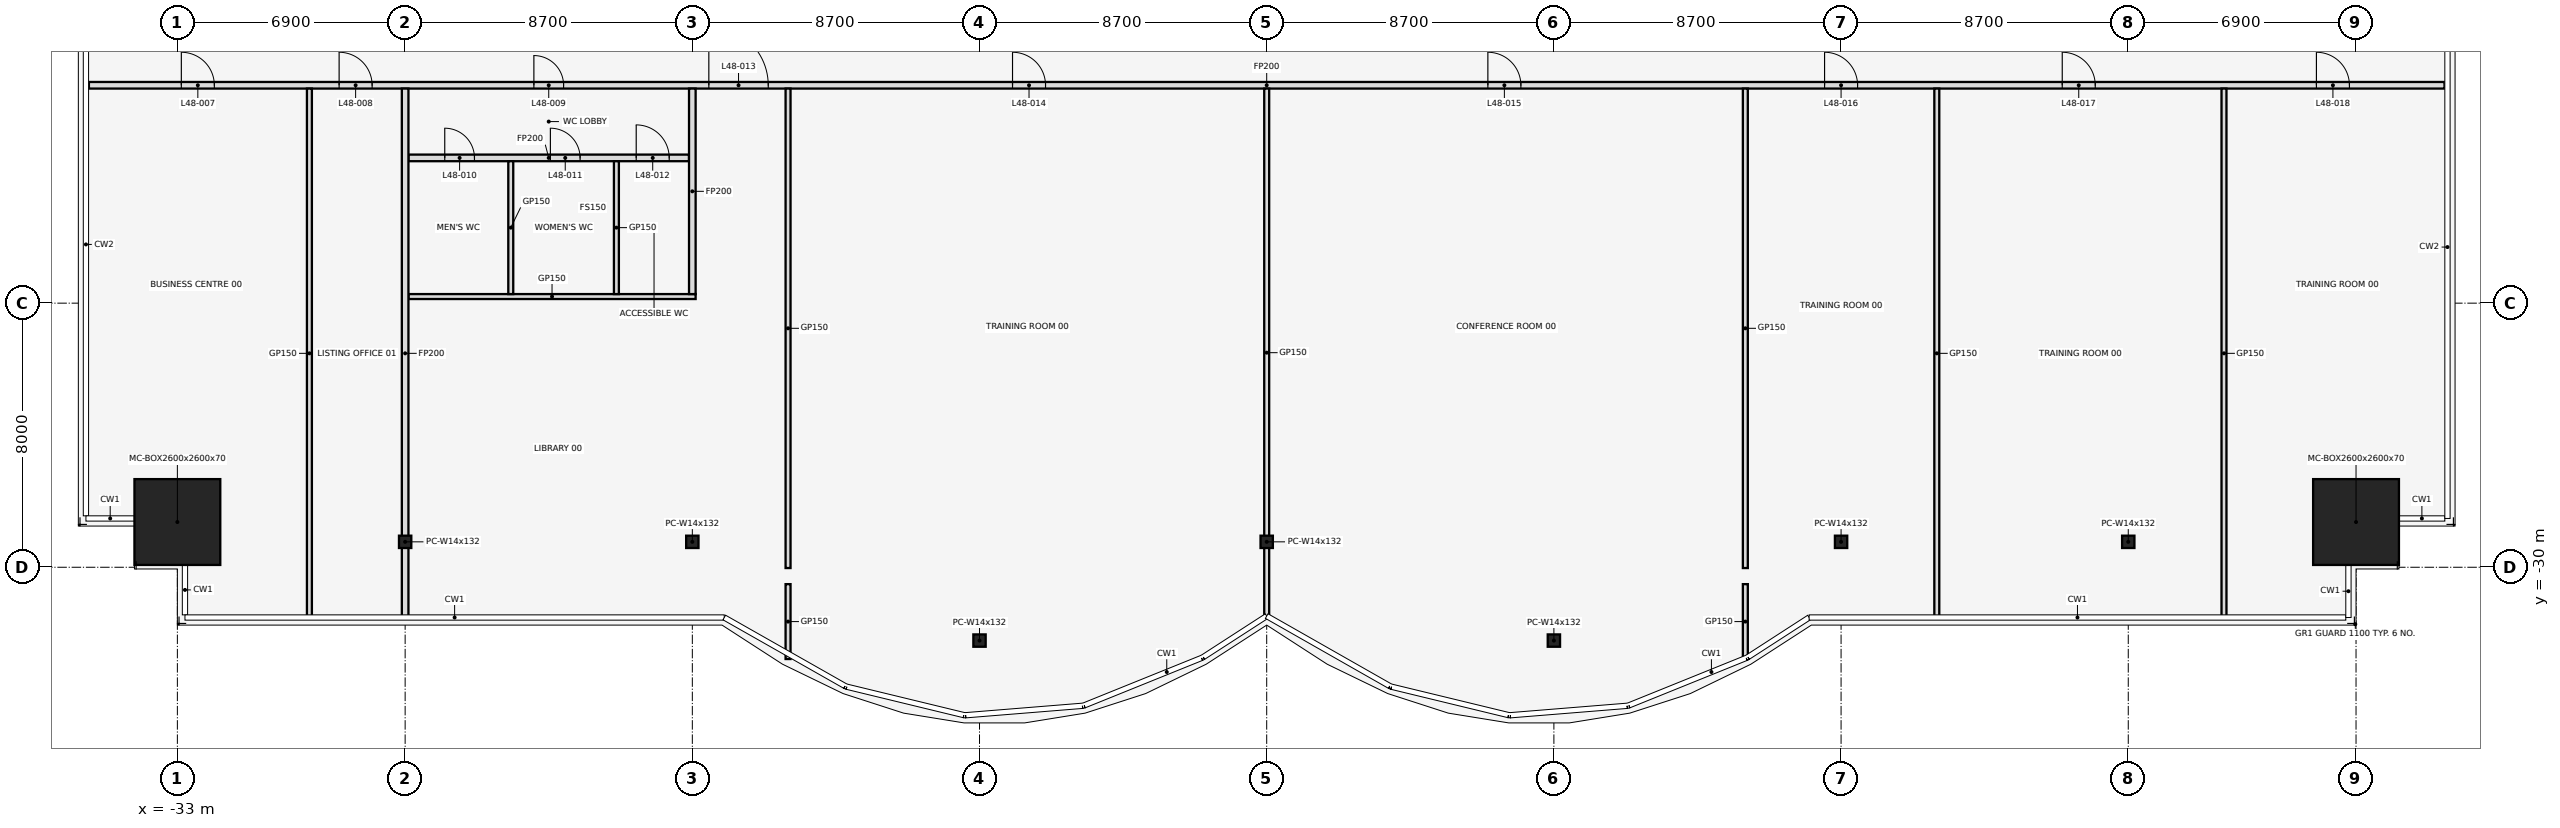
"""IFC4 building model, lengths in metres.
Left out: names, types, materials, properties, quantities, classifications, styles, units other than length and angle.
Written with IfcOpenShell. Run it as: python <this file> out.ifc"""

import sys

from ifc_helpers import new_model, si_unit, direction, frame, frame_2d, origin, origin_2d, place, context, subcontext, project, spatial, rectangle, hollow_rectangle, i_section, extrude, element, fill, save


model = new_model("IFC4")
c1 = context("Model", 3, precision=1e-05, world=origin(), true_north=direction((0.0, 1.0)))
c2 = subcontext(c1, "Body", "Model", "MODEL_VIEW")
j1 = project(units=[si_unit("LENGTHUNIT", "METRE"), si_unit("PLANEANGLEUNIT", "RADIAN")], contexts=[c1])
p1 = place(None, origin())
s1 = spatial("IfcSite", under=j1, at=p1, CompositionType="ELEMENT")
p2 = place(p1, origin())
s2 = spatial("IfcBuilding", under=s1, at=p2, CompositionType="ELEMENT")
p3 = place(p2, frame((0.0, 0.0, 215.5)))
s3 = spatial("IfcBuildingStorey", under=s2, at=p3, CompositionType="ELEMENT", Elevation=215.5)
p4 = place(p3, frame((-33.0, -28.63, 0.0), z_axis=(0.0, 0.0, 1.0), x_axis=(1.0, 0.0, 0.0)))
e1 = element("IfcColumn", 1, at=p4, inside=s3, PredefinedType="COLUMN", context=c2, shape_type="SweptSolid", body=[
    extrude(hollow_rectangle(XDim=2.6, YDim=2.6, WallThickness=0.07, at=origin_2d()), origin(), (0.0, 0.0, 1.0), 4.1),
])
for number, where, z_axis, x_axis in (
    (2, (-26.1, -29.23, 0.0), (0.0, 0.0, 1.0), (1.0, 0.0, 0.0)),
    (3, (-17.4, -29.23, 0.0), (0.0, 0.0, 1.0), (1.0, 0.0, 0.0)),
    (4, (-8.7, -32.221, 0.0), (0.0, 0.0, 1.0), (1.0, 0.0, 0.0)),
    (5, (0.0, -29.23, 0.0), (0.0, 0.0, 1.0), (1.0, 0.0, 0.0)),
    (6, (8.7, -32.221, 0.0), (0.0, 0.0, 1.0), (1.0, 0.0, 0.0)),
    (7, (17.4, -29.23, 0.0), (0.0, 0.0, 1.0), (1.0, 0.0, 0.0)),
    (8, (26.1, -29.23, 0.0), (0.0, 0.0, 1.0), (1.0, 0.0, 0.0)),
):
    element("IfcColumn", number, at=place(p3, frame(where, z_axis=z_axis, x_axis=x_axis)), inside=s3, PredefinedType="COLUMN", context=c2, shape_type="SweptSolid", body=[
        extrude(i_section(OverallWidth=0.373, OverallDepth=0.373, WebThickness=0.016, FlangeThickness=0.026, at=origin_2d()), origin(), (0.0, 0.0, 1.0), 4.1),
    ])
p5 = place(p3, frame((33.0, -28.63, 0.0), z_axis=(0.0, 0.0, 1.0), x_axis=(1.0, 0.0, 0.0)))
e9 = element("IfcColumn", 9, at=p5, inside=s3, PredefinedType="COLUMN", context=c2, shape_type="SweptSolid", body=[
    extrude(hollow_rectangle(XDim=2.6, YDim=2.6, WallThickness=0.07, at=origin_2d()), origin(), (0.0, 0.0, 1.0), 4.1),
])
p6 = place(p3, frame((-26.0, -21.8, 0.0), z_axis=(0.0, 0.0, 1.0), x_axis=(1.0, 0.0, 0.0)))
e10 = element("IfcWall", 10, at=p6, inside=s3, PredefinedType="PARTITIONING", context=c2, shape_type="SweptSolid", body=[
    extrude(rectangle(XDim=8.7, YDim=0.15, at=frame_2d((4.35, 0.0))), origin(), (0.0, 0.0, 1.0), 2.84),
])
p7 = place(p3, frame((-26.0, -17.6, 0.0), z_axis=(0.0, 0.0, 1.0), x_axis=(1.0, 0.0, 0.0)))
e11 = element("IfcWall", 11, at=p7, inside=s3, PredefinedType="PARTITIONING", context=c2, shape_type="SweptSolid", body=[
    extrude(rectangle(XDim=8.5, YDim=0.2, at=frame_2d((4.25, 0.0))), origin(), (0.0, 0.0, 1.0), 2.84),
])
p8 = place(p7, frame((1.1, 0.0, 0.0)))
e12 = element("IfcOpeningElement", 12, at=p8, cuts=e11, PredefinedType="OPENING", context=c2, shape_type="SweptSolid", body=[
    extrude(rectangle(XDim=0.9, YDim=2.1, at=frame_2d((0.45, 1.05))), frame((0.0, 0.112, 0.0), z_axis=(0.0, -1.0, 0.0), x_axis=(1.0, 0.0, 0.0)), (0.0, 0.0, 1.0), 0.224),
])
p9 = place(p7, frame((4.3, 0.0, 0.0)))
e13 = element("IfcOpeningElement", 13, at=p9, cuts=e11, PredefinedType="OPENING", context=c2, shape_type="SweptSolid", body=[
    extrude(rectangle(XDim=0.9, YDim=2.1, at=frame_2d((0.45, 1.05))), frame((0.0, 0.112, 0.0), z_axis=(0.0, -1.0, 0.0), x_axis=(1.0, 0.0, 0.0)), (0.0, 0.0, 1.0), 0.224),
])
p10 = place(p7, frame((6.9, 0.0, 0.0)))
e14 = element("IfcOpeningElement", 14, at=p10, cuts=e11, PredefinedType="OPENING", context=c2, shape_type="SweptSolid", body=[
    extrude(rectangle(XDim=1.0, YDim=2.1, at=frame_2d((0.5, 1.05))), frame((0.0, 0.112, 0.0), z_axis=(0.0, -1.0, 0.0), x_axis=(1.0, 0.0, 0.0)), (0.0, 0.0, 1.0), 0.224),
])
p11 = place(p3, frame((-35.68, -15.4, 0.0), z_axis=(0.0, 0.0, 1.0), x_axis=(1.0, 0.0, 0.0)))
e15 = element("IfcWall", 15, at=p11, inside=s3, PredefinedType="PARTITIONING", context=c2, shape_type="SweptSolid", body=[
    extrude(rectangle(XDim=71.36, YDim=0.2, at=frame_2d((35.68, 0.0))), origin(), (0.0, 0.0, 1.0), 2.84),
])
p12 = place(p11, frame((2.8, 0.0, 0.0)))
e16 = element("IfcOpeningElement", 16, at=p12, cuts=e15, PredefinedType="OPENING", context=c2, shape_type="SweptSolid", body=[
    extrude(rectangle(XDim=1.0, YDim=2.1, at=frame_2d((0.5, 1.05))), frame((0.0, 0.112, 0.0), z_axis=(0.0, -1.0, 0.0), x_axis=(1.0, 0.0, 0.0)), (0.0, 0.0, 1.0), 0.224),
])
p13 = place(p11, frame((7.58, 0.0, 0.0)))
e17 = element("IfcOpeningElement", 17, at=p13, cuts=e15, PredefinedType="OPENING", context=c2, shape_type="SweptSolid", body=[
    extrude(rectangle(XDim=1.0, YDim=2.1, at=frame_2d((0.5, 1.05))), frame((0.0, 0.112, 0.0), z_axis=(0.0, -1.0, 0.0), x_axis=(1.0, 0.0, 0.0)), (0.0, 0.0, 1.0), 0.224),
])
p14 = place(p11, frame((13.48, 0.0, 0.0)))
e18 = element("IfcOpeningElement", 18, at=p14, cuts=e15, PredefinedType="OPENING", context=c2, shape_type="SweptSolid", body=[
    extrude(rectangle(XDim=0.9, YDim=2.1, at=frame_2d((0.45, 1.05))), frame((0.0, 0.112, 0.0), z_axis=(0.0, -1.0, 0.0), x_axis=(1.0, 0.0, 0.0)), (0.0, 0.0, 1.0), 0.224),
])
p15 = place(p11, frame((18.78, 0.0, 0.0)))
e19 = element("IfcOpeningElement", 19, at=p15, cuts=e15, PredefinedType="OPENING", context=c2, shape_type="SweptSolid", body=[
    extrude(rectangle(XDim=1.8, YDim=2.1, at=frame_2d((0.9, 1.05))), frame((0.0, 0.112, 0.0), z_axis=(0.0, -1.0, 0.0), x_axis=(1.0, 0.0, 0.0)), (0.0, 0.0, 1.0), 0.224),
])
p16 = place(p11, frame((27.98, 0.0, 0.0)))
e20 = element("IfcOpeningElement", 20, at=p16, cuts=e15, PredefinedType="OPENING", context=c2, shape_type="SweptSolid", body=[
    extrude(rectangle(XDim=1.0, YDim=2.1, at=frame_2d((0.5, 1.05))), frame((0.0, 0.112, 0.0), z_axis=(0.0, -1.0, 0.0), x_axis=(1.0, 0.0, 0.0)), (0.0, 0.0, 1.0), 0.224),
])
p17 = place(p11, frame((42.38, 0.0, 0.0)))
e21 = element("IfcOpeningElement", 21, at=p17, cuts=e15, PredefinedType="OPENING", context=c2, shape_type="SweptSolid", body=[
    extrude(rectangle(XDim=1.0, YDim=2.1, at=frame_2d((0.5, 1.05))), frame((0.0, 0.112, 0.0), z_axis=(0.0, -1.0, 0.0), x_axis=(1.0, 0.0, 0.0)), (0.0, 0.0, 1.0), 0.224),
])
p18 = place(p11, frame((52.58, 0.0, 0.0)))
e22 = element("IfcOpeningElement", 22, at=p18, cuts=e15, PredefinedType="OPENING", context=c2, shape_type="SweptSolid", body=[
    extrude(rectangle(XDim=1.0, YDim=2.1, at=frame_2d((0.5, 1.05))), frame((0.0, 0.112, 0.0), z_axis=(0.0, -1.0, 0.0), x_axis=(1.0, 0.0, 0.0)), (0.0, 0.0, 1.0), 0.224),
])
p19 = place(p11, frame((59.78, 0.0, 0.0)))
e23 = element("IfcOpeningElement", 23, at=p19, cuts=e15, PredefinedType="OPENING", context=c2, shape_type="SweptSolid", body=[
    extrude(rectangle(XDim=1.0, YDim=2.1, at=frame_2d((0.5, 1.05))), frame((0.0, 0.112, 0.0), z_axis=(0.0, -1.0, 0.0), x_axis=(1.0, 0.0, 0.0)), (0.0, 0.0, 1.0), 0.224),
])
p20 = place(p11, frame((67.48, 0.0, 0.0)))
e24 = element("IfcOpeningElement", 24, at=p20, cuts=e15, PredefinedType="OPENING", context=c2, shape_type="SweptSolid", body=[
    extrude(rectangle(XDim=1.0, YDim=2.1, at=frame_2d((0.5, 1.05))), frame((0.0, 0.112, 0.0), z_axis=(0.0, -1.0, 0.0), x_axis=(1.0, 0.0, 0.0)), (0.0, 0.0, 1.0), 0.224),
])
p21 = place(p3, frame((-29.0, -31.54, 0.0), z_axis=(0.0, 0.0, 1.0), x_axis=(0.0, 1.0, 0.0)))
e25 = element("IfcWall", 25, at=p21, inside=s3, PredefinedType="PARTITIONING", context=c2, shape_type="SweptSolid", body=[
    extrude(rectangle(XDim=16.04, YDim=0.15, at=frame_2d((8.02, 0.0))), origin(), (0.0, 0.0, 1.0), 2.84),
])
p22 = place(p3, frame((-26.1, -31.54, 0.0), z_axis=(0.0, 0.0, 1.0), x_axis=(0.0, 1.0, 0.0)))
e26 = element("IfcWall", 26, at=p22, inside=s3, PredefinedType="PARTITIONING", context=c2, shape_type="SweptSolid", body=[
    extrude(rectangle(XDim=16.04, YDim=0.2, at=frame_2d((8.02, 0.0))), origin(), (0.0, 0.0, 1.0), 2.84),
])
for number, where, z_axis, x_axis in (
    (27, (-22.9, -21.725, 0.0), (0.0, 0.0, 1.0), (0.0, 1.0, 0.0)),
    (28, (-19.7, -21.725, 0.0), (0.0, 0.0, 1.0), (0.0, 1.0, 0.0)),
):
    element("IfcWall", number, at=place(p3, frame(where, z_axis=z_axis, x_axis=x_axis)), inside=s3, PredefinedType="PARTITIONING", context=c2, shape_type="SweptSolid", body=[
        extrude(rectangle(XDim=4.025, YDim=0.15, at=frame_2d((2.013, 0.0))), origin(), (0.0, 0.0, 1.0), 2.84),
    ])
p23 = place(p3, frame((-17.4, -21.725, 0.0), z_axis=(0.0, 0.0, 1.0), x_axis=(0.0, 1.0, 0.0)))
e29 = element("IfcWall", 29, at=p23, inside=s3, PredefinedType="PARTITIONING", context=c2, shape_type="SweptSolid", body=[
    extrude(rectangle(XDim=6.225, YDim=0.2, at=frame_2d((3.113, 0.0))), origin(), (0.0, 0.0, 1.0), 2.84),
])
p24 = place(p3, frame((-14.5, -32.78, 0.0), z_axis=(0.0, 0.0, 1.0), x_axis=(0.0, 1.0, 0.0)))
e30 = element("IfcWall", 30, at=p24, inside=s3, PredefinedType="PARTITIONING", context=c2, shape_type="SweptSolid", body=[
    extrude(rectangle(XDim=2.269, YDim=0.15, at=frame_2d((1.134, 0.0))), origin(), (0.0, 0.0, 1.0), 2.84),
])
p25 = place(p3, frame((-14.5, -30.024, 0.0), z_axis=(0.0, 0.0, 1.0), x_axis=(0.0, 1.0, 0.0)))
e31 = element("IfcWall", 31, at=p25, inside=s3, PredefinedType="PARTITIONING", context=c2, shape_type="SweptSolid", body=[
    extrude(rectangle(XDim=14.524, YDim=0.15, at=frame_2d((7.262, 0.0))), origin(), (0.0, 0.0, 1.0), 2.84),
])
p26 = place(p3, frame((0.0, -31.5, 0.0), z_axis=(0.0, 0.0, 1.0), x_axis=(0.0, 1.0, 0.0)))
e32 = element("IfcWall", 32, at=p26, inside=s3, PredefinedType="PARTITIONING", context=c2, shape_type="SweptSolid", body=[
    extrude(rectangle(XDim=16.0, YDim=0.15, at=frame_2d((8.0, 0.0))), origin(), (0.0, 0.0, 1.0), 2.84),
])
p27 = place(p3, frame((14.5, -32.78, 0.0), z_axis=(0.0, 0.0, 1.0), x_axis=(0.0, 1.0, 0.0)))
e33 = element("IfcWall", 33, at=p27, inside=s3, PredefinedType="PARTITIONING", context=c2, shape_type="SweptSolid", body=[
    extrude(rectangle(XDim=2.269, YDim=0.15, at=frame_2d((1.134, 0.0))), origin(), (0.0, 0.0, 1.0), 2.84),
])
p28 = place(p3, frame((14.5, -30.024, 0.0), z_axis=(0.0, 0.0, 1.0), x_axis=(0.0, 1.0, 0.0)))
e34 = element("IfcWall", 34, at=p28, inside=s3, PredefinedType="PARTITIONING", context=c2, shape_type="SweptSolid", body=[
    extrude(rectangle(XDim=14.524, YDim=0.15, at=frame_2d((7.262, 0.0))), origin(), (0.0, 0.0, 1.0), 2.84),
])
for number, where, z_axis, x_axis in (
    (35, (20.3, -31.54, 0.0), (0.0, 0.0, 1.0), (0.0, 1.0, 0.0)),
    (36, (29.0, -31.54, 0.0), (0.0, 0.0, 1.0), (0.0, 1.0, 0.0)),
):
    element("IfcWall", number, at=place(p3, frame(where, z_axis=z_axis, x_axis=x_axis)), inside=s3, PredefinedType="PARTITIONING", context=c2, shape_type="SweptSolid", body=[
        extrude(rectangle(XDim=16.04, YDim=0.15, at=frame_2d((8.02, 0.0))), origin(), (0.0, 0.0, 1.0), 2.84),
    ])
p29 = place(p12, frame((1.0, 0.0, 0.0), z_axis=(0.0, 0.0, 1.0), x_axis=(-1.0, 0.0, 0.0)))
e37 = element("IfcDoor", 37, at=p29, inside=s3, OperationType="SINGLE_SWING_LEFT", PredefinedType="DOOR", context=c2, shape_type="SweptSolid", body=[
    extrude(rectangle(XDim=1.0, YDim=2.1, at=frame_2d((0.5, 1.05))), frame((0.0, 0.025, 0.0), z_axis=(0.0, -1.0, 0.0), x_axis=(1.0, 0.0, 0.0)), (0.0, 0.0, 1.0), 0.05),
])
fill(e16, e37)
p30 = place(p13, frame((1.0, 0.0, 0.0), z_axis=(0.0, 0.0, 1.0), x_axis=(-1.0, 0.0, 0.0)))
e38 = element("IfcDoor", 38, at=p30, inside=s3, OperationType="SINGLE_SWING_RIGHT", PredefinedType="DOOR", context=c2, shape_type="SweptSolid", body=[
    extrude(rectangle(XDim=1.0, YDim=2.1, at=frame_2d((0.5, 1.05))), frame((0.0, 0.025, 0.0), z_axis=(0.0, -1.0, 0.0), x_axis=(1.0, 0.0, 0.0)), (0.0, 0.0, 1.0), 0.05),
])
fill(e17, e38)
p31 = place(p14, frame((0.9, 0.0, 0.0), z_axis=(0.0, 0.0, 1.0), x_axis=(-1.0, 0.0, 0.0)))
e39 = element("IfcDoor", 39, at=p31, inside=s3, OperationType="SINGLE_SWING_RIGHT", PredefinedType="DOOR", context=c2, shape_type="SweptSolid", body=[
    extrude(rectangle(XDim=0.9, YDim=2.1, at=frame_2d((0.45, 1.05))), frame((0.0, 0.025, 0.0), z_axis=(0.0, -1.0, 0.0), x_axis=(1.0, 0.0, 0.0)), (0.0, 0.0, 1.0), 0.05),
])
fill(e18, e39)
p32 = place(p8, frame((0.9, 0.0, 0.0), z_axis=(0.0, 0.0, 1.0), x_axis=(-1.0, 0.0, 0.0)))
e40 = element("IfcDoor", 40, at=p32, inside=s3, OperationType="SINGLE_SWING_LEFT", PredefinedType="DOOR", context=c2, shape_type="SweptSolid", body=[
    extrude(rectangle(XDim=0.9, YDim=2.1, at=frame_2d((0.45, 1.05))), frame((0.0, 0.025, 0.0), z_axis=(0.0, -1.0, 0.0), x_axis=(1.0, 0.0, 0.0)), (0.0, 0.0, 1.0), 0.05),
])
fill(e12, e40)
p33 = place(p9, frame((0.9, 0.0, 0.0), z_axis=(0.0, 0.0, 1.0), x_axis=(-1.0, 0.0, 0.0)))
e41 = element("IfcDoor", 41, at=p33, inside=s3, OperationType="SINGLE_SWING_RIGHT", PredefinedType="DOOR", context=c2, shape_type="SweptSolid", body=[
    extrude(rectangle(XDim=0.9, YDim=2.1, at=frame_2d((0.45, 1.05))), frame((0.0, 0.025, 0.0), z_axis=(0.0, -1.0, 0.0), x_axis=(1.0, 0.0, 0.0)), (0.0, 0.0, 1.0), 0.05),
])
fill(e13, e41)
p34 = place(p10, frame((1.0, 0.0, 0.0), z_axis=(0.0, 0.0, 1.0), x_axis=(-1.0, 0.0, 0.0)))
e42 = element("IfcDoor", 42, at=p34, inside=s3, OperationType="SINGLE_SWING_RIGHT", PredefinedType="DOOR", context=c2, shape_type="SweptSolid", body=[
    extrude(rectangle(XDim=1.0, YDim=2.1, at=frame_2d((0.5, 1.05))), frame((0.0, 0.025, 0.0), z_axis=(0.0, -1.0, 0.0), x_axis=(1.0, 0.0, 0.0)), (0.0, 0.0, 1.0), 0.05),
])
fill(e14, e42)
p35 = place(p15, origin())
e43 = element("IfcDoor", 43, at=p35, inside=s3, OperationType="SINGLE_SWING_LEFT", PredefinedType="DOOR", context=c2, shape_type="SweptSolid", body=[
    extrude(rectangle(XDim=1.8, YDim=2.1, at=frame_2d((0.9, 1.05))), frame((0.0, 0.025, 0.0), z_axis=(0.0, -1.0, 0.0), x_axis=(1.0, 0.0, 0.0)), (0.0, 0.0, 1.0), 0.05),
])
fill(e19, e43)
p36 = place(p16, frame((1.0, 0.0, 0.0), z_axis=(0.0, 0.0, 1.0), x_axis=(-1.0, 0.0, 0.0)))
e44 = element("IfcDoor", 44, at=p36, inside=s3, OperationType="SINGLE_SWING_RIGHT", PredefinedType="DOOR", context=c2, shape_type="SweptSolid", body=[
    extrude(rectangle(XDim=1.0, YDim=2.1, at=frame_2d((0.5, 1.05))), frame((0.0, 0.025, 0.0), z_axis=(0.0, -1.0, 0.0), x_axis=(1.0, 0.0, 0.0)), (0.0, 0.0, 1.0), 0.05),
])
fill(e20, e44)
p37 = place(p17, frame((1.0, 0.0, 0.0), z_axis=(0.0, 0.0, 1.0), x_axis=(-1.0, 0.0, 0.0)))
e45 = element("IfcDoor", 45, at=p37, inside=s3, OperationType="SINGLE_SWING_RIGHT", PredefinedType="DOOR", context=c2, shape_type="SweptSolid", body=[
    extrude(rectangle(XDim=1.0, YDim=2.1, at=frame_2d((0.5, 1.05))), frame((0.0, 0.025, 0.0), z_axis=(0.0, -1.0, 0.0), x_axis=(1.0, 0.0, 0.0)), (0.0, 0.0, 1.0), 0.05),
])
fill(e21, e45)
p38 = place(p18, frame((1.0, 0.0, 0.0), z_axis=(0.0, 0.0, 1.0), x_axis=(-1.0, 0.0, 0.0)))
e46 = element("IfcDoor", 46, at=p38, inside=s3, OperationType="SINGLE_SWING_LEFT", PredefinedType="DOOR", context=c2, shape_type="SweptSolid", body=[
    extrude(rectangle(XDim=1.0, YDim=2.1, at=frame_2d((0.5, 1.05))), frame((0.0, 0.025, 0.0), z_axis=(0.0, -1.0, 0.0), x_axis=(1.0, 0.0, 0.0)), (0.0, 0.0, 1.0), 0.05),
])
fill(e22, e46)
p39 = place(p19, frame((1.0, 0.0, 0.0), z_axis=(0.0, 0.0, 1.0), x_axis=(-1.0, 0.0, 0.0)))
e47 = element("IfcDoor", 47, at=p39, inside=s3, OperationType="SINGLE_SWING_RIGHT", PredefinedType="DOOR", context=c2, shape_type="SweptSolid", body=[
    extrude(rectangle(XDim=1.0, YDim=2.1, at=frame_2d((0.5, 1.05))), frame((0.0, 0.025, 0.0), z_axis=(0.0, -1.0, 0.0), x_axis=(1.0, 0.0, 0.0)), (0.0, 0.0, 1.0), 0.05),
])
fill(e23, e47)
p40 = place(p20, frame((1.0, 0.0, 0.0), z_axis=(0.0, 0.0, 1.0), x_axis=(-1.0, 0.0, 0.0)))
e48 = element("IfcDoor", 48, at=p40, inside=s3, OperationType="SINGLE_SWING_RIGHT", PredefinedType="DOOR", context=c2, shape_type="SweptSolid", body=[
    extrude(rectangle(XDim=1.0, YDim=2.1, at=frame_2d((0.5, 1.05))), frame((0.0, 0.025, 0.0), z_axis=(0.0, -1.0, 0.0), x_axis=(1.0, 0.0, 0.0)), (0.0, 0.0, 1.0), 0.05),
])
fill(e24, e48)
save(model, sys.argv[1])
